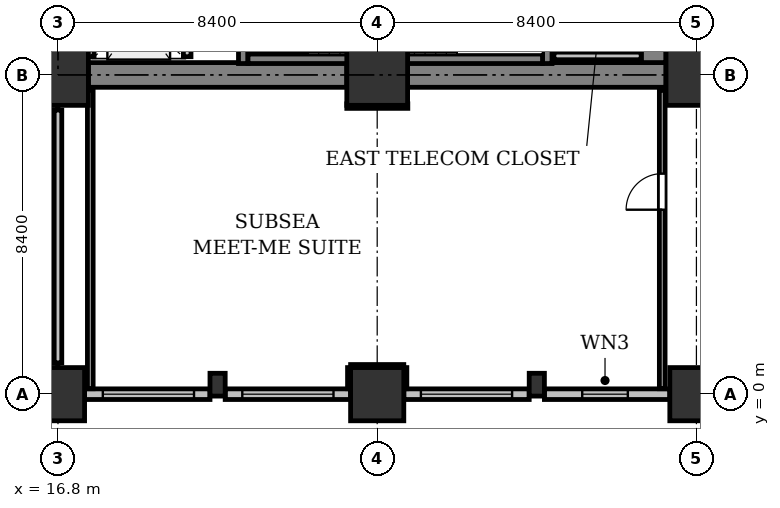
"""IFC4 building model, lengths in metres.
Left out: names, types, materials, properties, quantities, classifications, styles, units other than length and angle.
Written with IfcOpenShell. Run it as: python <this file> out.ifc"""

import sys

from ifc_helpers import new_model, si_unit, direction, frame, frame_2d, origin, origin_2d, place, context, subcontext, project, spatial, rectangle, extrude, element, fill, save


model = new_model("IFC4")
c1 = context("Model", 3, precision=1e-05, world=origin(), true_north=direction((0.0, 1.0)))
c2 = subcontext(c1, "Body", "Model", "MODEL_VIEW")
j1 = project(units=[si_unit("LENGTHUNIT", "METRE"), si_unit("PLANEANGLEUNIT", "RADIAN")], contexts=[c1])
p1 = place(None, origin())
s1 = spatial("IfcSite", under=j1, at=p1, CompositionType="ELEMENT")
p2 = place(p1, origin())
s2 = spatial("IfcBuilding", under=s1, at=p2, CompositionType="ELEMENT")
p3 = place(p2, origin())
s3 = spatial("IfcBuildingStorey", under=s2, at=p3, CompositionType="ELEMENT", Elevation=0.0)
p4 = place(p3, frame((16.8, 0.0, 0.0), z_axis=(0.0, 0.0, 1.0), x_axis=(1.0, 0.0, 0.0)))
e1 = element("IfcColumn", 1, at=p4, inside=s3, PredefinedType="COLUMN", context=c2, shape_type="SweptSolid", body=[
    extrude(rectangle(XDim=1.4, YDim=1.4, at=origin_2d()), origin(), (0.0, 0.0, 1.0), 5.4),
])
p5 = place(p3, frame((16.8, 8.4, 0.0), z_axis=(0.0, 0.0, 1.0), x_axis=(1.0, 0.0, 0.0)))
e2 = element("IfcColumn", 2, at=p5, inside=s3, PredefinedType="COLUMN", context=c2, shape_type="SweptSolid", body=[
    extrude(rectangle(XDim=1.6, YDim=1.6, at=origin_2d()), origin(), (0.0, 0.0, 1.0), 5.4),
])
p6 = place(p3, frame((25.2, 0.0, 0.0), z_axis=(0.0, 0.0, 1.0), x_axis=(1.0, 0.0, 0.0)))
e3 = element("IfcColumn", 3, at=p6, inside=s3, PredefinedType="COLUMN", context=c2, shape_type="SweptSolid", body=[
    extrude(rectangle(XDim=1.4, YDim=1.4, at=origin_2d()), origin(), (0.0, 0.0, 1.0), 5.4),
])
p7 = place(p3, frame((25.2, 8.4, 0.0), z_axis=(0.0, 0.0, 1.0), x_axis=(1.0, 0.0, 0.0)))
e4 = element("IfcColumn", 4, at=p7, inside=s3, PredefinedType="COLUMN", context=c2, shape_type="SweptSolid", body=[
    extrude(rectangle(XDim=1.6, YDim=1.6, at=origin_2d()), origin(), (0.0, 0.0, 1.0), 5.4),
])
p8 = place(p3, frame((33.6, 0.0, 0.0), z_axis=(0.0, 0.0, 1.0), x_axis=(1.0, 0.0, 0.0)))
e5 = element("IfcColumn", 5, at=p8, inside=s3, PredefinedType="COLUMN", context=c2, shape_type="SweptSolid", body=[
    extrude(rectangle(XDim=1.4, YDim=1.4, at=origin_2d()), origin(), (0.0, 0.0, 1.0), 5.4),
])
p9 = place(p3, frame((33.6, 8.4, 0.0), z_axis=(0.0, 0.0, 1.0), x_axis=(1.0, 0.0, 0.0)))
e6 = element("IfcColumn", 6, at=p9, inside=s3, PredefinedType="COLUMN", context=c2, shape_type="SweptSolid", body=[
    extrude(rectangle(XDim=1.6, YDim=1.6, at=origin_2d()), origin(), (0.0, 0.0, 1.0), 5.4),
])
for number, where, z_axis, x_axis in (
    (7, (21.0, 0.25, 0.0), (0.0, 0.0, 1.0), (1.0, 0.0, 0.0)),
    (8, (29.4, 0.25, 0.0), (0.0, 0.0, 1.0), (1.0, 0.0, 0.0)),
):
    element("IfcColumn", number, at=place(p3, frame(where, z_axis=z_axis, x_axis=x_axis)), inside=s3, PredefinedType="PILASTER", context=c2, shape_type="SweptSolid", body=[
        extrude(rectangle(XDim=0.4, YDim=0.6, at=origin_2d()), origin(), (0.0, 0.0, 1.0), 5.4),
    ])
p10 = place(p3, frame((32.9, 0.0, 0.0), z_axis=(0.0, 0.0, 1.0), x_axis=(-1.0, 0.0, 0.0)))
e9 = element("IfcWall", 9, at=p10, inside=s3, PredefinedType="STANDARD", context=c2, shape_type="SweptSolid", body=[
    extrude(rectangle(XDim=3.3, YDim=0.28, at=frame_2d((1.65, 0.0))), origin(), (0.0, 0.0, 1.0), 4.325),
])
p11 = place(p10, frame((1.105, 0.0, 0.9)))
e10 = element("IfcOpeningElement", 10, at=p11, cuts=e9, PredefinedType="OPENING", context=c2, shape_type="SweptSolid", body=[
    extrude(rectangle(XDim=1.2, YDim=1.5, at=frame_2d((0.6, 0.75))), frame((0.0, 0.15, 0.0), z_axis=(0.0, -1.0, 0.0), x_axis=(1.0, 0.0, 0.0)), (0.0, 0.0, 1.0), 0.3),
])
p12 = place(p3, frame((29.2, 0.0, 0.0), z_axis=(0.0, 0.0, 1.0), x_axis=(-1.0, 0.0, 0.0)))
e11 = element("IfcWall", 11, at=p12, inside=s3, PredefinedType="STANDARD", context=c2, shape_type="SweptSolid", body=[
    extrude(rectangle(XDim=3.3, YDim=0.28, at=frame_2d((1.65, 0.0))), origin(), (0.0, 0.0, 1.0), 4.325),
])
p13 = place(p12, frame((0.45, 0.0, 0.9)))
e12 = element("IfcOpeningElement", 12, at=p13, cuts=e11, PredefinedType="OPENING", context=c2, shape_type="SweptSolid", body=[
    extrude(rectangle(XDim=2.4, YDim=1.8, at=frame_2d((1.2, 0.9))), frame((0.0, 0.15, 0.0), z_axis=(0.0, -1.0, 0.0), x_axis=(1.0, 0.0, 0.0)), (0.0, 0.0, 1.0), 0.3),
])
p14 = place(p3, frame((24.5, 0.0, 0.0), z_axis=(0.0, 0.0, 1.0), x_axis=(-1.0, 0.0, 0.0)))
e13 = element("IfcWall", 13, at=p14, inside=s3, PredefinedType="STANDARD", context=c2, shape_type="SweptSolid", body=[
    extrude(rectangle(XDim=3.3, YDim=0.28, at=frame_2d((1.65, 0.0))), origin(), (0.0, 0.0, 1.0), 4.325),
])
p15 = place(p14, frame((0.45, 0.0, 0.9)))
e14 = element("IfcOpeningElement", 14, at=p15, cuts=e13, PredefinedType="OPENING", context=c2, shape_type="SweptSolid", body=[
    extrude(rectangle(XDim=2.4, YDim=1.8, at=frame_2d((1.2, 0.9))), frame((0.0, 0.15, 0.0), z_axis=(0.0, -1.0, 0.0), x_axis=(1.0, 0.0, 0.0)), (0.0, 0.0, 1.0), 0.3),
])
p16 = place(p3, frame((20.8, 0.0, 0.0), z_axis=(0.0, 0.0, 1.0), x_axis=(-1.0, 0.0, 0.0)))
e15 = element("IfcWall", 15, at=p16, inside=s3, PredefinedType="STANDARD", context=c2, shape_type="SweptSolid", body=[
    extrude(rectangle(XDim=3.3, YDim=0.28, at=frame_2d((1.65, 0.0))), origin(), (0.0, 0.0, 1.0), 4.325),
])
p17 = place(p16, frame((0.42, 0.0, 0.9)))
e16 = element("IfcOpeningElement", 16, at=p17, cuts=e15, PredefinedType="OPENING", context=c2, shape_type="SweptSolid", body=[
    extrude(rectangle(XDim=2.4, YDim=1.8, at=frame_2d((1.2, 0.9))), frame((0.0, 0.15, 0.0), z_axis=(0.0, -1.0, 0.0), x_axis=(1.0, 0.0, 0.0)), (0.0, 0.0, 1.0), 0.3),
])
p18 = place(p3, frame((17.6, 8.4, 0.0), z_axis=(0.0, 0.0, 1.0), x_axis=(1.0, 0.0, 0.0)))
e17 = element("IfcWall", 17, at=p18, inside=s3, PredefinedType="SHEAR", context=c2, shape_type="SweptSolid", body=[
    extrude(rectangle(XDim=6.8, YDim=0.65, at=frame_2d((3.4, 0.0))), origin(), (0.0, 0.0, 1.0), 5.125),
])
p19 = place(p3, frame((26.0, 8.4, 0.0), z_axis=(0.0, 0.0, 1.0), x_axis=(1.0, 0.0, 0.0)))
e18 = element("IfcWall", 18, at=p19, inside=s3, PredefinedType="SHEAR", context=c2, shape_type="SweptSolid", body=[
    extrude(rectangle(XDim=6.8, YDim=0.65, at=frame_2d((3.4, 0.0))), origin(), (0.0, 0.0, 1.0), 5.125),
])
p20 = place(p3, frame((32.475, 8.725, 0.0), z_axis=(0.0, 0.0, 1.0), x_axis=(0.0, 1.0, 0.0)))
e19 = element("IfcWall", 19, at=p20, inside=s3, PredefinedType="SHEAR", context=c2, shape_type="SweptSolid", body=[
    extrude(rectangle(XDim=7.75, YDim=0.65, at=frame_2d((3.875, 0.0))), origin(), (0.0, 0.0, 1.0), 5.125),
])
p21 = place(p20, frame((3.975, 0.0, 0.0)))
e20 = element("IfcOpeningElement", 20, at=p21, cuts=e19, PredefinedType="OPENING", context=c2, shape_type="SweptSolid", body=[
    extrude(rectangle(XDim=1.1, YDim=2.15, at=frame_2d((0.55, 1.075))), frame((0.0, 0.335, 0.0), z_axis=(0.0, -1.0, 0.0), x_axis=(1.0, 0.0, 0.0)), (0.0, 0.0, 1.0), 0.67),
])
for number, where, z_axis, x_axis in (
    (21, (21.675, 8.7, 0.0), (0.0, 0.0, 1.0), (0.0, 1.0, 0.0)),
    (22, (29.675, 8.7, 0.0), (0.0, 0.0, 1.0), (0.0, 1.0, 0.0)),
):
    element("IfcWall", number, at=place(p3, frame(where, z_axis=z_axis, x_axis=x_axis)), inside=s3, PredefinedType="SHEAR", context=c2, shape_type="SweptSolid", body=[
        extrude(rectangle(XDim=3.75, YDim=0.25, at=frame_2d((1.875, 0.0))), origin(), (0.0, 0.0, 1.0), 5.125),
    ])
p22 = place(p3, frame((21.8, 8.825, 0.0), z_axis=(0.0, 0.0, 1.0), x_axis=(1.0, 0.0, 0.0)))
e23 = element("IfcWall", 23, at=p22, inside=s3, PredefinedType="SHEAR", context=c2, shape_type="SweptSolid", body=[
    extrude(rectangle(XDim=7.75, YDim=0.25, at=frame_2d((3.875, 0.0))), origin(), (0.0, 0.0, 1.0), 5.125),
])
for number, where, z_axis, x_axis in (
    (24, (20.2, 8.88, 0.0), (0.0, 0.0, 1.0), (0.0, 1.0, 0.0)),
    (25, (17.65, 8.88, 0.0), (0.0, 0.0, 1.0), (0.0, 1.0, 0.0)),
):
    element("IfcWall", number, at=place(p3, frame(where, z_axis=z_axis, x_axis=x_axis)), inside=s3, PredefinedType="PARTITIONING", context=c2, shape_type="SweptSolid", body=[
        extrude(rectangle(XDim=2.1, YDim=0.2, at=frame_2d((1.05, 0.0))), origin(), (0.0, 0.0, 1.0), 5.125),
    ])
p23 = place(p3, frame((16.8, 7.58, 0.0), z_axis=(0.0, 0.0, 1.0), x_axis=(-1.0, 0.0, 0.0)))
e26 = element("IfcWall", 26, at=p23, inside=s3, PredefinedType="PARTITIONING", context=c2, shape_type="SweptSolid", body=[
    extrude(rectangle(XDim=0.8, YDim=0.2, at=frame_2d((0.4, 0.0))), origin(), (0.0, 0.0, 1.0), 4.513),
])
p24 = place(p3, frame((16.1, 0.72, 0.0), z_axis=(0.0, 0.0, 1.0), x_axis=(1.0, 0.0, 0.0)))
e27 = element("IfcWall", 27, at=p24, inside=s3, PredefinedType="PARTITIONING", context=c2, shape_type="SweptSolid", body=[
    extrude(rectangle(XDim=0.7, YDim=0.2, at=frame_2d((0.35, 0.0))), origin(), (0.0, 0.0, 1.0), 4.513),
])
p25 = place(p3, frame((16.8, 0.824, 0.0), z_axis=(0.0, 0.0, 1.0), x_axis=(0.0, 1.0, 0.0)))
e28 = element("IfcWall", 28, at=p25, inside=s3, PredefinedType="PARTITIONING", context=c2, shape_type="SweptSolid", body=[
    extrude(rectangle(XDim=6.652, YDim=0.2, at=frame_2d((3.326, 0.0))), origin(), (0.0, 0.0, 1.0), 4.513),
])
p26 = place(p3, frame((29.85, 8.9, 0.0), z_axis=(0.0, 0.0, 1.0), x_axis=(1.0, 0.0, 0.0)))
e29 = element("IfcWall", 29, at=p26, inside=s3, PredefinedType="PARTITIONING", context=c2, shape_type="SweptSolid", body=[
    extrude(rectangle(XDim=2.296, YDim=0.2, at=frame_2d((1.148, 0.0))), origin(), (0.0, 0.0, 1.0), 5.125),
])
p27 = place(p3, frame((17.65, 8.0, 0.0), z_axis=(0.0, 0.0, 1.0), x_axis=(0.0, -1.0, 0.0)))
e30 = element("IfcWall", 30, at=p27, inside=s3, PredefinedType="PARTITIONING", context=c2, shape_type="SweptSolid", body=[
    extrude(rectangle(XDim=7.856, YDim=0.15, at=frame_2d((3.928, 0.0))), origin(), (0.0, 0.0, 1.0), 5.125),
])
p28 = place(p3, frame((24.48, 0.144, 0.0), z_axis=(0.0, 0.0, 1.0), x_axis=(0.0, 1.0, 0.0)))
e31 = element("IfcWall", 31, at=p28, inside=s3, PredefinedType="PARTITIONING", context=c2, shape_type="SweptSolid", body=[
    extrude(rectangle(XDim=0.556, YDim=0.12, at=frame_2d((0.278, 0.0))), origin(), (0.0, 0.0, 1.0), 5.125),
])
p29 = place(p3, frame((24.5, 0.72, 0.0), z_axis=(0.0, 0.0, 1.0), x_axis=(1.0, 0.0, 0.0)))
e32 = element("IfcWall", 32, at=p29, inside=s3, PredefinedType="PARTITIONING", context=c2, shape_type="SweptSolid", body=[
    extrude(rectangle(XDim=1.4, YDim=0.12, at=frame_2d((0.7, 0.0))), origin(), (0.0, 0.0, 1.0), 4.513),
])
p30 = place(p3, frame((25.92, 0.7, 0.0), z_axis=(0.0, 0.0, 1.0), x_axis=(0.0, -1.0, 0.0)))
e33 = element("IfcWall", 33, at=p30, inside=s3, PredefinedType="PARTITIONING", context=c2, shape_type="SweptSolid", body=[
    extrude(rectangle(XDim=0.556, YDim=0.12, at=frame_2d((0.278, 0.0))), origin(), (0.0, 0.0, 1.0), 5.125),
])
p31 = place(p3, frame((32.7, 0.144, 0.0), z_axis=(0.0, 0.0, 1.0), x_axis=(0.0, 1.0, 0.0)))
e34 = element("IfcWall", 34, at=p31, inside=s3, PredefinedType="PARTITIONING", context=c2, shape_type="SweptSolid", body=[
    extrude(rectangle(XDim=7.856, YDim=0.15, at=frame_2d((3.928, 0.0))), origin(), (0.0, 0.0, 1.0), 5.125),
])
p32 = place(p31, frame((4.71, 0.0, 0.0)))
e35 = element("IfcOpeningElement", 35, at=p32, cuts=e34, PredefinedType="OPENING", context=c2, shape_type="SweptSolid", body=[
    extrude(rectangle(XDim=0.95, YDim=2.15, at=frame_2d((0.475, 1.075))), frame((0.0, 0.085, 0.0), z_axis=(0.0, -1.0, 0.0), x_axis=(1.0, 0.0, 0.0)), (0.0, 0.0, 1.0), 0.17),
])
p33 = place(p3, frame((26.006, 7.581, 0.0), z_axis=(0.0, 0.0, 1.0), x_axis=(-0.999999896002, -0.000456065626, 0.0)))
e36 = element("IfcWall", 36, at=p33, inside=s3, PredefinedType="PARTITIONING", context=c2, shape_type="SweptSolid", body=[
    extrude(rectangle(XDim=1.606, YDim=0.12, at=frame_2d((0.803, 0.0))), origin(), (0.0, 0.0, 1.0), 4.513),
])
p34 = place(p11, origin())
e37 = element("IfcWindow", 37, at=p34, inside=s3, PartitioningType="SINGLE_PANEL", PredefinedType="WINDOW", context=c2, shape_type="SweptSolid", body=[
    extrude(rectangle(XDim=1.2, YDim=1.5, at=frame_2d((0.6, 0.75))), frame((0.0, 0.03, 0.0), z_axis=(0.0, -1.0, 0.0), x_axis=(1.0, 0.0, 0.0)), (0.0, 0.0, 1.0), 0.06),
])
fill(e10, e37)
p35 = place(p13, origin())
e38 = element("IfcWindow", 38, at=p35, inside=s3, PartitioningType="SINGLE_PANEL", PredefinedType="WINDOW", context=c2, shape_type="SweptSolid", body=[
    extrude(rectangle(XDim=2.4, YDim=1.8, at=frame_2d((1.2, 0.9))), frame((0.0, 0.03, 0.0), z_axis=(0.0, -1.0, 0.0), x_axis=(1.0, 0.0, 0.0)), (0.0, 0.0, 1.0), 0.06),
])
fill(e12, e38)
p36 = place(p15, origin())
e39 = element("IfcWindow", 39, at=p36, inside=s3, PartitioningType="SINGLE_PANEL", PredefinedType="WINDOW", context=c2, shape_type="SweptSolid", body=[
    extrude(rectangle(XDim=2.4, YDim=1.8, at=frame_2d((1.2, 0.9))), frame((0.0, 0.03, 0.0), z_axis=(0.0, -1.0, 0.0), x_axis=(1.0, 0.0, 0.0)), (0.0, 0.0, 1.0), 0.06),
])
fill(e14, e39)
p37 = place(p17, origin())
e40 = element("IfcWindow", 40, at=p37, inside=s3, PartitioningType="SINGLE_PANEL", PredefinedType="WINDOW", context=c2, shape_type="SweptSolid", body=[
    extrude(rectangle(XDim=2.4, YDim=1.8, at=frame_2d((1.2, 0.9))), frame((0.0, 0.03, 0.0), z_axis=(0.0, -1.0, 0.0), x_axis=(1.0, 0.0, 0.0)), (0.0, 0.0, 1.0), 0.06),
])
fill(e16, e40)
p38 = place(p32, origin())
e41 = element("IfcDoor", 41, at=p38, inside=s3, OperationType="SINGLE_SWING_LEFT", PredefinedType="DOOR", context=c2, shape_type="SweptSolid", body=[
    extrude(rectangle(XDim=0.95, YDim=2.15, at=frame_2d((0.475, 1.075))), frame((0.0, 0.025, 0.0), z_axis=(0.0, -1.0, 0.0), x_axis=(1.0, 0.0, 0.0)), (0.0, 0.0, 1.0), 0.05),
])
fill(e35, e41)
save(model, sys.argv[1])
